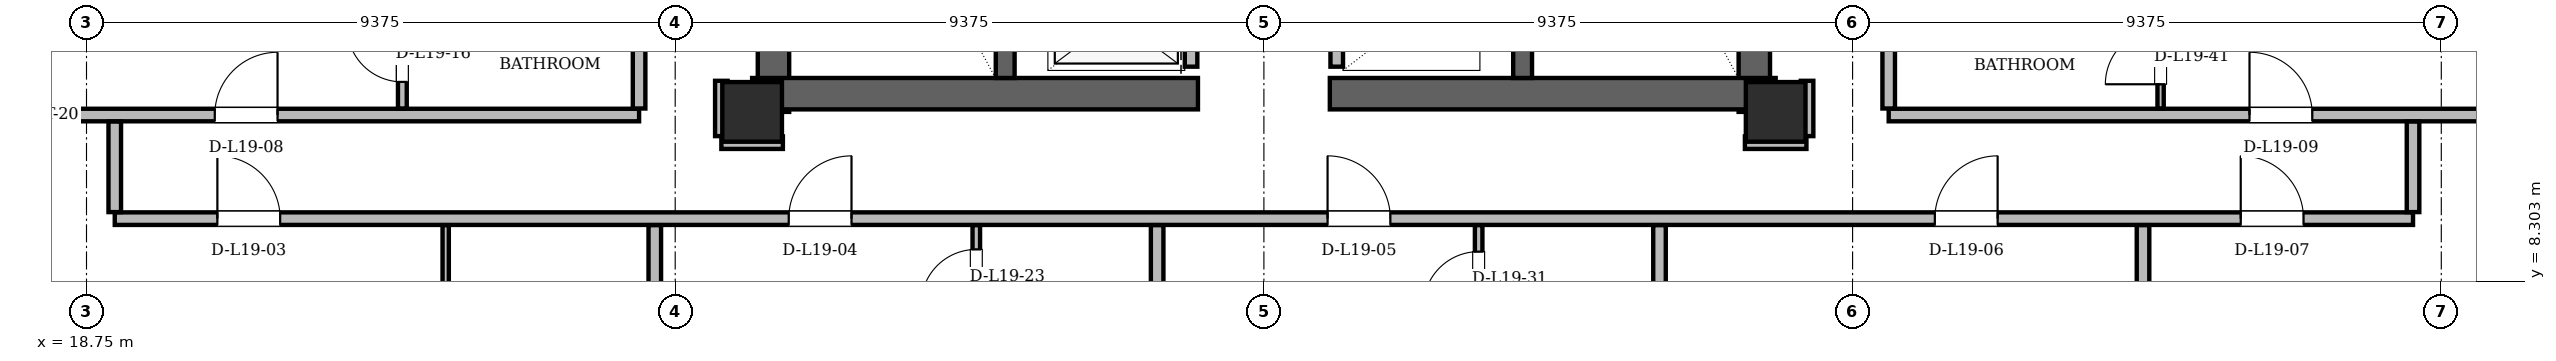
"""IFC4 building model, lengths in metres.
Left out: names, types, materials, properties, quantities, classifications, styles, units other than length and angle.
Written with IfcOpenShell. Run it as: python <this file> out.ifc"""

import sys

from ifc_helpers import new_model, si_unit, direction, frame, frame_2d, origin, origin_2d, place, context, subcontext, project, spatial, rectangle, hollow_rectangle, extrude, element, fill, save


model = new_model("IFC4")
c1 = context("Model", 3, precision=1e-05, world=origin(), true_north=direction((0.0, 1.0)))
c2 = subcontext(c1, "Body", "Model", "MODEL_VIEW")
j1 = project(units=[si_unit("LENGTHUNIT", "METRE"), si_unit("PLANEANGLEUNIT", "RADIAN")], contexts=[c1])
p1 = place(None, origin())
s1 = spatial("IfcSite", under=j1, at=p1, CompositionType="ELEMENT")
p2 = place(p1, origin())
s2 = spatial("IfcBuilding", under=s1, at=p2, CompositionType="ELEMENT")
p3 = place(p2, frame((0.0, 0.0, 74.1)))
s3 = spatial("IfcBuildingStorey", under=s2, at=p3, CompositionType="ELEMENT", Elevation=74.1)
for number, where, z_axis, x_axis in (
    (1, (29.35, 11.0, 0.0), (0.0, 0.0, 1.0), (1.0, 0.0, 0.0)),
    (2, (45.65, 11.0, 0.0), (0.0, 0.0, 1.0), (1.0, 0.0, 0.0)),
):
    element("IfcColumn", number, at=place(p3, frame(where, z_axis=z_axis, x_axis=x_axis)), inside=s3, PredefinedType="COLUMN", context=c2, shape_type="SweptSolid", body=[
        extrude(hollow_rectangle(XDim=0.95, YDim=0.95, WallThickness=0.08, at=origin_2d()), origin(), (0.0, 0.0, 1.0), 3.6),
    ])
for number, where, z_axis, x_axis in (
    (3, (29.69, 11.0, 0.0), (0.0, 0.0, 1.0), (0.0, 1.0, 0.0)),
    (4, (45.31, 11.0, 0.0), (0.0, 0.0, 1.0), (0.0, 1.0, 0.0)),
):
    element("IfcWall", number, at=place(p3, frame(where, z_axis=z_axis, x_axis=x_axis)), inside=s3, PredefinedType="SHEAR", context=c2, shape_type="SweptSolid", body=[
        extrude(rectangle(XDim=13.3, YDim=0.5, at=frame_2d((6.65, 0.0))), origin(), (0.0, 0.0, 1.0), 3.34),
    ])
for number, where, z_axis, x_axis in (
    (5, (29.35, 11.29, 0.0), (0.0, 0.0, 1.0), (1.0, 0.0, 0.0)),
    (6, (38.55, 11.29, 0.0), (0.0, 0.0, 1.0), (1.0, 0.0, 0.0)),
):
    element("IfcWall", number, at=place(p3, frame(where, z_axis=z_axis, x_axis=x_axis)), inside=s3, PredefinedType="SHEAR", context=c2, shape_type="SweptSolid", body=[
        extrude(rectangle(XDim=7.1, YDim=0.5, at=frame_2d((3.55, 0.0))), origin(), (0.0, 0.0, 1.0), 3.34),
    ])
for number, where, z_axis, x_axis in (
    (7, (33.38, 11.54, 0.0), (0.0, 0.0, 1.0), (0.0, 1.0, 0.0)),
    (8, (41.62, 11.54, 0.0), (0.0, 0.0, 1.0), (0.0, 1.0, 0.0)),
):
    element("IfcWall", number, at=place(p3, frame(where, z_axis=z_axis, x_axis=x_axis)), inside=s3, PredefinedType="SHEAR", context=c2, shape_type="SweptSolid", body=[
        extrude(rectangle(XDim=7.62, YDim=0.3, at=frame_2d((3.81, 0.0))), origin(), (0.0, 0.0, 1.0), 3.34),
    ])
for number, where, z_axis, x_axis in (
    (9, (13.907, 14.127, 0.0), (0.0, 0.0, 1.0), (0.5, -0.866, 0.0)),
    (10, (54.469, 2.654, 0.0), (0.0, 0.0, 1.0), (0.5, 0.866, 0.0)),
):
    element("IfcWall", number, at=place(p3, frame(where, z_axis=z_axis, x_axis=x_axis)), inside=s3, PredefinedType="SOLIDWALL", context=c2, shape_type="SweptSolid", body=[
        extrude(rectangle(XDim=13.248, YDim=0.34, at=frame_2d((6.624, 0.0))), origin(), (0.0, 0.0, 1.0), 2.474),
    ])
p4 = place(p3, frame((36.34, 11.72, 0.0), z_axis=(0.0, 0.0, 1.0), x_axis=(0.0, 1.0, 0.0)))
e11 = element("IfcWall", 11, at=p4, inside=s3, PredefinedType="PARTITIONING", context=c2, shape_type="SweptSolid", body=[
    extrude(rectangle(XDim=7.6, YDim=0.2, at=frame_2d((3.8, 0.0))), origin(), (0.0, 0.0, 1.0), 3.34),
])
p5 = place(p4, frame((0.255, 0.0, 0.0)))
e12 = element("IfcOpeningElement", 12, at=p5, cuts=e11, PredefinedType="OPENING", context=c2, shape_type="SweptSolid", body=[
    extrude(rectangle(XDim=1.05, YDim=2.15, at=frame_2d((0.525, 1.075))), frame((0.0, 0.1, 0.0), z_axis=(0.0, -1.0, 0.0), x_axis=(1.0, 0.0, 0.0)), (0.0, 0.0, 1.0), 0.2),
])
p6 = place(p4, frame((2.105, 0.0, 0.0)))
e13 = element("IfcOpeningElement", 13, at=p6, cuts=e11, PredefinedType="OPENING", context=c2, shape_type="SweptSolid", body=[
    extrude(rectangle(XDim=1.05, YDim=2.15, at=frame_2d((0.525, 1.075))), frame((0.0, 0.1, 0.0), z_axis=(0.0, -1.0, 0.0), x_axis=(1.0, 0.0, 0.0)), (0.0, 0.0, 1.0), 0.2),
])
p7 = place(p4, frame((3.955, 0.0, 0.0)))
e14 = element("IfcOpeningElement", 14, at=p7, cuts=e11, PredefinedType="OPENING", context=c2, shape_type="SweptSolid", body=[
    extrude(rectangle(XDim=1.05, YDim=2.15, at=frame_2d((0.525, 1.075))), frame((0.0, 0.1, 0.0), z_axis=(0.0, -1.0, 0.0), x_axis=(1.0, 0.0, 0.0)), (0.0, 0.0, 1.0), 0.2),
])
p8 = place(p3, frame((38.66, 11.72, 0.0), z_axis=(0.0, 0.0, 1.0), x_axis=(0.0, 1.0, 0.0)))
e15 = element("IfcWall", 15, at=p8, inside=s3, PredefinedType="PARTITIONING", context=c2, shape_type="SweptSolid", body=[
    extrude(rectangle(XDim=9.1, YDim=0.2, at=frame_2d((4.55, 0.0))), origin(), (0.0, 0.0, 1.0), 3.34),
])
p9 = place(p3, frame((19.2, 9.3, 0.0), z_axis=(0.0, 0.0, 1.0), x_axis=(1.0, 0.0, 0.0)))
e16 = element("IfcWall", 16, at=p9, inside=s3, PredefinedType="PARTITIONING", context=c2, shape_type="SweptSolid", body=[
    extrude(rectangle(XDim=36.6, YDim=0.2, at=frame_2d((18.3, 0.0))), origin(), (0.0, 0.0, 1.0), 2.718),
])
p10 = place(p9, frame((1.634, 0.0, 0.0)))
e17 = element("IfcOpeningElement", 17, at=p10, cuts=e16, PredefinedType="OPENING", context=c2, shape_type="SweptSolid", body=[
    extrude(rectangle(XDim=1.0, YDim=2.18, at=frame_2d((0.5, 1.09))), frame((0.0, 0.1, 0.0), z_axis=(0.0, -1.0, 0.0), x_axis=(1.0, 0.0, 0.0)), (0.0, 0.0, 1.0), 0.2),
])
p11 = place(p9, frame((10.733, 0.0, 0.0)))
e18 = element("IfcOpeningElement", 18, at=p11, cuts=e16, PredefinedType="OPENING", context=c2, shape_type="SweptSolid", body=[
    extrude(rectangle(XDim=1.0, YDim=2.18, at=frame_2d((0.5, 1.09))), frame((0.0, 0.1, 0.0), z_axis=(0.0, -1.0, 0.0), x_axis=(1.0, 0.0, 0.0)), (0.0, 0.0, 1.0), 0.2),
])
p12 = place(p9, frame((19.314, 0.0, 0.0)))
e19 = element("IfcOpeningElement", 19, at=p12, cuts=e16, PredefinedType="OPENING", context=c2, shape_type="SweptSolid", body=[
    extrude(rectangle(XDim=1.0, YDim=2.18, at=frame_2d((0.5, 1.09))), frame((0.0, 0.1, 0.0), z_axis=(0.0, -1.0, 0.0), x_axis=(1.0, 0.0, 0.0)), (0.0, 0.0, 1.0), 0.2),
])
p13 = place(p9, frame((28.985, 0.0, 0.0)))
e20 = element("IfcOpeningElement", 20, at=p13, cuts=e16, PredefinedType="OPENING", context=c2, shape_type="SweptSolid", body=[
    extrude(rectangle(XDim=1.0, YDim=2.18, at=frame_2d((0.5, 1.09))), frame((0.0, 0.1, 0.0), z_axis=(0.0, -1.0, 0.0), x_axis=(1.0, 0.0, 0.0)), (0.0, 0.0, 1.0), 0.2),
])
p14 = place(p9, frame((33.856, 0.0, 0.0)))
e21 = element("IfcOpeningElement", 21, at=p14, cuts=e16, PredefinedType="OPENING", context=c2, shape_type="SweptSolid", body=[
    extrude(rectangle(XDim=1.0, YDim=2.18, at=frame_2d((0.5, 1.09))), frame((0.0, 0.1, 0.0), z_axis=(0.0, -1.0, 0.0), x_axis=(1.0, 0.0, 0.0)), (0.0, 0.0, 1.0), 0.2),
])
for number, where, z_axis, x_axis in (
    (22, (28.86, 10.51, 0.0), (0.0, 0.0, 1.0), (1.0, 0.0, 0.0)),
    (23, (45.16, 10.51, 0.0), (0.0, 0.0, 1.0), (1.0, 0.0, 0.0)),
):
    element("IfcWall", number, at=place(p3, frame(where, z_axis=z_axis, x_axis=x_axis)), inside=s3, PredefinedType="PARTITIONING", context=c2, shape_type="SweptSolid", body=[
        extrude(rectangle(XDim=0.98, YDim=0.2, at=frame_2d((0.49, 0.0))), origin(), (0.0, 0.0, 1.0), 2.718),
    ])
p15 = place(p3, frame((15.942, 10.95, 0.0), z_axis=(0.0, 0.0, 1.0), x_axis=(1.0, 0.0, 0.0)))
e24 = element("IfcWall", 24, at=p15, inside=s3, PredefinedType="PARTITIONING", context=c2, shape_type="SweptSolid", body=[
    extrude(rectangle(XDim=11.608, YDim=0.2, at=frame_2d((5.804, 0.0))), origin(), (0.0, 0.0, 1.0), 3.34),
])
p16 = place(p15, frame((4.85, 0.0, 0.0)))
e25 = element("IfcOpeningElement", 25, at=p16, cuts=e24, PredefinedType="OPENING", context=c2, shape_type="SweptSolid", body=[
    extrude(rectangle(XDim=1.0, YDim=2.18, at=frame_2d((0.5, 1.09))), frame((0.0, 0.1, 0.0), z_axis=(0.0, -1.0, 0.0), x_axis=(1.0, 0.0, 0.0)), (0.0, 0.0, 1.0), 0.2),
])
p17 = place(p3, frame((47.45, 10.95, 0.0), z_axis=(0.0, 0.0, 1.0), x_axis=(1.0, 0.0, 0.0)))
e26 = element("IfcWall", 26, at=p17, inside=s3, PredefinedType="PARTITIONING", context=c2, shape_type="SweptSolid", body=[
    extrude(rectangle(XDim=11.608, YDim=0.2, at=frame_2d((5.804, 0.0))), origin(), (0.0, 0.0, 1.0), 3.34),
])
p18 = place(p17, frame((5.746, 0.0, 0.0)))
e27 = element("IfcOpeningElement", 27, at=p18, cuts=e26, PredefinedType="OPENING", context=c2, shape_type="SweptSolid", body=[
    extrude(rectangle(XDim=1.0, YDim=2.18, at=frame_2d((0.5, 1.09))), frame((0.0, 0.1, 0.0), z_axis=(0.0, -1.0, 0.0), x_axis=(1.0, 0.0, 0.0)), (0.0, 0.0, 1.0), 0.2),
])
p19 = place(p3, frame((19.2, 9.404, 0.0), z_axis=(0.0, 0.0, 1.0), x_axis=(0.0, 1.0, 0.0)))
e28 = element("IfcWall", 28, at=p19, inside=s3, PredefinedType="PARTITIONING", context=c2, shape_type="SweptSolid", body=[
    extrude(rectangle(XDim=1.442, YDim=0.2, at=frame_2d((0.721, 0.0))), origin(), (0.0, 0.0, 1.0), 3.34),
])
p20 = place(p3, frame((23.78, 11.054, 0.0), z_axis=(0.0, 0.0, 1.0), x_axis=(0.0, 1.0, 0.0)))
e29 = element("IfcWall", 29, at=p20, inside=s3, PredefinedType="PARTITIONING", context=c2, shape_type="SweptSolid", body=[
    extrude(rectangle(XDim=4.042, YDim=0.14, at=frame_2d((2.021, 0.0))), origin(), (0.0, 0.0, 1.0), 2.718),
])
p21 = place(p20, frame((0.424, 0.0, 0.0)))
e30 = element("IfcOpeningElement", 30, at=p21, cuts=e29, PredefinedType="OPENING", context=c2, shape_type="SweptSolid", body=[
    extrude(rectangle(XDim=0.88, YDim=2.08, at=frame_2d((0.44, 1.04))), frame((0.0, 0.07, 0.0), z_axis=(0.0, -1.0, 0.0), x_axis=(1.0, 0.0, 0.0)), (0.0, 0.0, 1.0), 0.14),
])
p22 = place(p20, frame((2.544, 0.0, 0.0)))
e31 = element("IfcOpeningElement", 31, at=p22, cuts=e29, PredefinedType="OPENING", context=c2, shape_type="SweptSolid", body=[
    extrude(rectangle(XDim=0.95, YDim=2.1, at=frame_2d((0.475, 1.05))), frame((0.0, 0.07, 0.0), z_axis=(0.0, -1.0, 0.0), x_axis=(1.0, 0.0, 0.0)), (0.0, 0.0, 1.0), 0.14),
])
p23 = place(p3, frame((24.47, 2.828, 0.0), z_axis=(0.0, 0.0, 1.0), x_axis=(0.0, 1.0, 0.0)))
e32 = element("IfcWall", 32, at=p23, inside=s3, PredefinedType="PARTITIONING", context=c2, shape_type="SweptSolid", body=[
    extrude(rectangle(XDim=6.368, YDim=0.1, at=frame_2d((3.184, 0.0))), origin(), (0.0, 0.0, 1.0), 2.718),
])
p24 = place(p23, frame((2.784, 0.0, 0.0)))
e33 = element("IfcOpeningElement", 33, at=p24, cuts=e32, PredefinedType="OPENING", context=c2, shape_type="SweptSolid", body=[
    extrude(rectangle(XDim=0.88, YDim=2.08, at=frame_2d((0.44, 1.04))), frame((0.0, 0.05, 0.0), z_axis=(0.0, -1.0, 0.0), x_axis=(1.0, 0.0, 0.0)), (0.0, 0.0, 1.0), 0.1),
])
p25 = place(p3, frame((27.55, 11.054, 0.0), z_axis=(0.0, 0.0, 1.0), x_axis=(0.0, 1.0, 0.0)))
e34 = element("IfcWall", 34, at=p25, inside=s3, PredefinedType="PARTITIONING", context=c2, shape_type="SweptSolid", body=[
    extrude(rectangle(XDim=14.812, YDim=0.2, at=frame_2d((7.406, 0.0))), origin(), (0.0, 0.0, 1.0), 2.718),
])
p26 = place(p25, frame((6.031, 0.0, 0.0)))
e35 = element("IfcOpeningElement", 35, at=p26, cuts=e34, PredefinedType="OPENING", context=c2, shape_type="SweptSolid", body=[
    extrude(rectangle(XDim=1.0, YDim=2.18, at=frame_2d((0.5, 1.09))), frame((0.0, 0.1, 0.0), z_axis=(0.0, -1.0, 0.0), x_axis=(1.0, 0.0, 0.0)), (0.0, 0.0, 1.0), 0.2),
])
p27 = place(p3, frame((27.8, 2.828, 0.0), z_axis=(0.0, 0.0, 1.0), x_axis=(0.0, 1.0, 0.0)))
e36 = element("IfcWall", 36, at=p27, inside=s3, PredefinedType="PARTITIONING", context=c2, shape_type="SweptSolid", body=[
    extrude(rectangle(XDim=6.368, YDim=0.2, at=frame_2d((3.184, 0.0))), origin(), (0.0, 0.0, 1.0), 2.926),
])
p28 = place(p3, frame((28.86, 10.614, 0.0), z_axis=(0.0, 0.0, 1.0), x_axis=(0.0, 1.0, 0.0)))
e37 = element("IfcWall", 37, at=p28, inside=s3, PredefinedType="PARTITIONING", context=c2, shape_type="SweptSolid", body=[
    extrude(rectangle(XDim=0.881, YDim=0.2, at=frame_2d((0.44, 0.0))), origin(), (0.0, 0.0, 1.0), 2.718),
])
p29 = place(p3, frame((32.92, 2.828, 0.0), z_axis=(0.0, 0.0, 1.0), x_axis=(0.0, 1.0, 0.0)))
e38 = element("IfcWall", 38, at=p29, inside=s3, PredefinedType="PARTITIONING", context=c2, shape_type="SweptSolid", body=[
    extrude(rectangle(XDim=6.368, YDim=0.12, at=frame_2d((3.184, 0.0))), origin(), (0.0, 0.0, 1.0), 2.926),
])
p30 = place(p29, frame((1.789, 0.0, 0.0)))
e39 = element("IfcOpeningElement", 39, at=p30, cuts=e38, PredefinedType="OPENING", context=c2, shape_type="SweptSolid", body=[
    extrude(rectangle(XDim=0.95, YDim=2.1, at=frame_2d((0.475, 1.05))), frame((0.0, 0.06, 0.0), z_axis=(0.0, -1.0, 0.0), x_axis=(1.0, 0.0, 0.0)), (0.0, 0.0, 1.0), 0.12),
])
p31 = place(p29, frame((5.102, 0.0, 0.0)))
e40 = element("IfcOpeningElement", 40, at=p31, cuts=e38, PredefinedType="OPENING", context=c2, shape_type="SweptSolid", body=[
    extrude(rectangle(XDim=0.88, YDim=2.08, at=frame_2d((0.44, 1.04))), frame((0.0, 0.06, 0.0), z_axis=(0.0, -1.0, 0.0), x_axis=(1.0, 0.0, 0.0)), (0.0, 0.0, 1.0), 0.12),
])
p32 = place(p3, frame((35.8, 2.828, 0.0), z_axis=(0.0, 0.0, 1.0), x_axis=(0.0, 1.0, 0.0)))
e41 = element("IfcWall", 41, at=p32, inside=s3, PredefinedType="PARTITIONING", context=c2, shape_type="SweptSolid", body=[
    extrude(rectangle(XDim=6.368, YDim=0.2, at=frame_2d((3.184, 0.0))), origin(), (0.0, 0.0, 1.0), 3.34),
])
p33 = place(p3, frame((40.92, 2.828, 0.0), z_axis=(0.0, 0.0, 1.0), x_axis=(0.0, 1.0, 0.0)))
e42 = element("IfcWall", 42, at=p33, inside=s3, PredefinedType="PARTITIONING", context=c2, shape_type="SweptSolid", body=[
    extrude(rectangle(XDim=6.368, YDim=0.12, at=frame_2d((3.184, 0.0))), origin(), (0.0, 0.0, 1.0), 3.34),
])
p34 = place(p33, frame((1.754, 0.0, 0.0)))
e43 = element("IfcOpeningElement", 43, at=p34, cuts=e42, PredefinedType="OPENING", context=c2, shape_type="SweptSolid", body=[
    extrude(rectangle(XDim=0.95, YDim=2.1, at=frame_2d((0.475, 1.05))), frame((0.0, 0.06, 0.0), z_axis=(0.0, -1.0, 0.0), x_axis=(1.0, 0.0, 0.0)), (0.0, 0.0, 1.0), 0.12),
])
p35 = place(p33, frame((5.066, 0.0, 0.0)))
e44 = element("IfcOpeningElement", 44, at=p35, cuts=e42, PredefinedType="OPENING", context=c2, shape_type="SweptSolid", body=[
    extrude(rectangle(XDim=0.88, YDim=2.08, at=frame_2d((0.44, 1.04))), frame((0.0, 0.06, 0.0), z_axis=(0.0, -1.0, 0.0), x_axis=(1.0, 0.0, 0.0)), (0.0, 0.0, 1.0), 0.12),
])
p36 = place(p3, frame((43.8, 2.828, 0.0), z_axis=(0.0, 0.0, 1.0), x_axis=(0.0, 1.0, 0.0)))
e45 = element("IfcWall", 45, at=p36, inside=s3, PredefinedType="PARTITIONING", context=c2, shape_type="SweptSolid", body=[
    extrude(rectangle(XDim=6.368, YDim=0.2, at=frame_2d((3.184, 0.0))), origin(), (0.0, 0.0, 1.0), 2.926),
])
p37 = place(p3, frame((46.15, 10.614, 0.0), z_axis=(0.0, 0.0, 1.0), x_axis=(0.0, 1.0, 0.0)))
e46 = element("IfcWall", 46, at=p37, inside=s3, PredefinedType="PARTITIONING", context=c2, shape_type="SweptSolid", body=[
    extrude(rectangle(XDim=0.881, YDim=0.2, at=frame_2d((0.44, 0.0))), origin(), (0.0, 0.0, 1.0), 2.718),
])
p38 = place(p3, frame((47.45, 11.054, 0.0), z_axis=(0.0, 0.0, 1.0), x_axis=(0.0, 1.0, 0.0)))
e47 = element("IfcWall", 47, at=p38, inside=s3, PredefinedType="PARTITIONING", context=c2, shape_type="SweptSolid", body=[
    extrude(rectangle(XDim=14.812, YDim=0.2, at=frame_2d((7.406, 0.0))), origin(), (0.0, 0.0, 1.0), 2.718),
])
p39 = place(p38, frame((13.529, 0.0, 0.0)))
e48 = element("IfcOpeningElement", 48, at=p39, cuts=e47, PredefinedType="OPENING", context=c2, shape_type="SweptSolid", body=[
    extrude(rectangle(XDim=1.0, YDim=2.18, at=frame_2d((0.5, 1.09))), frame((0.0, 0.1, 0.0), z_axis=(0.0, -1.0, 0.0), x_axis=(1.0, 0.0, 0.0)), (0.0, 0.0, 1.0), 0.2),
])
p40 = place(p3, frame((51.5, 2.828, 0.0), z_axis=(0.0, 0.0, 1.0), x_axis=(0.0, 1.0, 0.0)))
e49 = element("IfcWall", 49, at=p40, inside=s3, PredefinedType="PARTITIONING", context=c2, shape_type="SweptSolid", body=[
    extrude(rectangle(XDim=6.368, YDim=0.2, at=frame_2d((3.184, 0.0))), origin(), (0.0, 0.0, 1.0), 2.718),
])
p41 = place(p3, frame((51.78, 11.054, 0.0), z_axis=(0.0, 0.0, 1.0), x_axis=(0.0, 1.0, 0.0)))
e50 = element("IfcWall", 50, at=p41, inside=s3, PredefinedType="PARTITIONING", context=c2, shape_type="SweptSolid", body=[
    extrude(rectangle(XDim=13.162, YDim=0.1, at=frame_2d((6.581, 0.0))), origin(), (0.0, 0.0, 1.0), 2.718),
])
p42 = place(p41, frame((0.386, 0.0, 0.0)))
e51 = element("IfcOpeningElement", 51, at=p42, cuts=e50, PredefinedType="OPENING", context=c2, shape_type="SweptSolid", body=[
    extrude(rectangle(XDim=0.88, YDim=2.08, at=frame_2d((0.44, 1.04))), frame((0.0, 0.05, 0.0), z_axis=(0.0, -1.0, 0.0), x_axis=(1.0, 0.0, 0.0)), (0.0, 0.0, 1.0), 0.1),
])
p43 = place(p41, frame((2.368, 0.0, 0.0)))
e52 = element("IfcOpeningElement", 52, at=p43, cuts=e50, PredefinedType="OPENING", context=c2, shape_type="SweptSolid", body=[
    extrude(rectangle(XDim=0.95, YDim=2.1, at=frame_2d((0.475, 1.05))), frame((0.0, 0.05, 0.0), z_axis=(0.0, -1.0, 0.0), x_axis=(1.0, 0.0, 0.0)), (0.0, 0.0, 1.0), 0.1),
])
p44 = place(p41, frame((8.138, 0.0, 0.0)))
e53 = element("IfcOpeningElement", 53, at=p44, cuts=e50, PredefinedType="OPENING", context=c2, shape_type="SweptSolid", body=[
    extrude(rectangle(XDim=0.92, YDim=2.12, at=frame_2d((0.46, 1.06))), frame((0.0, 0.05, 0.0), z_axis=(0.0, -1.0, 0.0), x_axis=(1.0, 0.0, 0.0)), (0.0, 0.0, 1.0), 0.1),
])
p45 = place(p3, frame((55.8, 9.404, 0.0), z_axis=(0.0, 0.0, 1.0), x_axis=(0.0, 1.0, 0.0)))
e54 = element("IfcWall", 54, at=p45, inside=s3, PredefinedType="PARTITIONING", context=c2, shape_type="SweptSolid", body=[
    extrude(rectangle(XDim=1.442, YDim=0.2, at=frame_2d((0.721, 0.0))), origin(), (0.0, 0.0, 1.0), 3.34),
])
p46 = place(p10, origin())
e55 = element("IfcDoor", 55, at=p46, inside=s3, OperationType="SINGLE_SWING_LEFT", PredefinedType="DOOR", context=c2, shape_type="SweptSolid", body=[
    extrude(rectangle(XDim=1.0, YDim=2.18, at=frame_2d((0.5, 1.09))), frame((0.0, 0.025, 0.0), z_axis=(0.0, -1.0, 0.0), x_axis=(1.0, 0.0, 0.0)), (0.0, 0.0, 1.0), 0.05),
])
fill(e17, e55)
p47 = place(p11, origin())
e56 = element("IfcDoor", 56, at=p47, inside=s3, OperationType="SINGLE_SWING_RIGHT", PredefinedType="DOOR", context=c2, shape_type="SweptSolid", body=[
    extrude(rectangle(XDim=1.0, YDim=2.18, at=frame_2d((0.5, 1.09))), frame((0.0, 0.025, 0.0), z_axis=(0.0, -1.0, 0.0), x_axis=(1.0, 0.0, 0.0)), (0.0, 0.0, 1.0), 0.05),
])
fill(e18, e56)
p48 = place(p12, origin())
e57 = element("IfcDoor", 57, at=p48, inside=s3, OperationType="SINGLE_SWING_LEFT", PredefinedType="DOOR", context=c2, shape_type="SweptSolid", body=[
    extrude(rectangle(XDim=1.0, YDim=2.18, at=frame_2d((0.5, 1.09))), frame((0.0, 0.025, 0.0), z_axis=(0.0, -1.0, 0.0), x_axis=(1.0, 0.0, 0.0)), (0.0, 0.0, 1.0), 0.05),
])
fill(e19, e57)
p49 = place(p13, origin())
e58 = element("IfcDoor", 58, at=p49, inside=s3, OperationType="SINGLE_SWING_RIGHT", PredefinedType="DOOR", context=c2, shape_type="SweptSolid", body=[
    extrude(rectangle(XDim=1.0, YDim=2.18, at=frame_2d((0.5, 1.09))), frame((0.0, 0.025, 0.0), z_axis=(0.0, -1.0, 0.0), x_axis=(1.0, 0.0, 0.0)), (0.0, 0.0, 1.0), 0.05),
])
fill(e20, e58)
p50 = place(p14, origin())
e59 = element("IfcDoor", 59, at=p50, inside=s3, OperationType="SINGLE_SWING_LEFT", PredefinedType="DOOR", context=c2, shape_type="SweptSolid", body=[
    extrude(rectangle(XDim=1.0, YDim=2.18, at=frame_2d((0.5, 1.09))), frame((0.0, 0.025, 0.0), z_axis=(0.0, -1.0, 0.0), x_axis=(1.0, 0.0, 0.0)), (0.0, 0.0, 1.0), 0.05),
])
fill(e21, e59)
p51 = place(p16, origin())
e60 = element("IfcDoor", 60, at=p51, inside=s3, OperationType="SINGLE_SWING_RIGHT", PredefinedType="DOOR", context=c2, shape_type="SweptSolid", body=[
    extrude(rectangle(XDim=1.0, YDim=2.18, at=frame_2d((0.5, 1.09))), frame((0.0, 0.025, 0.0), z_axis=(0.0, -1.0, 0.0), x_axis=(1.0, 0.0, 0.0)), (0.0, 0.0, 1.0), 0.05),
])
fill(e25, e60)
p52 = place(p18, origin())
e61 = element("IfcDoor", 61, at=p52, inside=s3, OperationType="SINGLE_SWING_LEFT", PredefinedType="DOOR", context=c2, shape_type="SweptSolid", body=[
    extrude(rectangle(XDim=1.0, YDim=2.18, at=frame_2d((0.5, 1.09))), frame((0.0, 0.025, 0.0), z_axis=(0.0, -1.0, 0.0), x_axis=(1.0, 0.0, 0.0)), (0.0, 0.0, 1.0), 0.05),
])
fill(e27, e61)
p53 = place(p21, origin())
e62 = element("IfcDoor", 62, at=p53, inside=s3, OperationType="SINGLE_SWING_RIGHT", PredefinedType="DOOR", context=c2, shape_type="SweptSolid", body=[
    extrude(rectangle(XDim=0.88, YDim=2.08, at=frame_2d((0.44, 1.04))), frame((0.0, 0.025, 0.0), z_axis=(0.0, -1.0, 0.0), x_axis=(1.0, 0.0, 0.0)), (0.0, 0.0, 1.0), 0.05),
])
fill(e30, e62)
p54 = place(p31, origin())
e63 = element("IfcDoor", 63, at=p54, inside=s3, OperationType="SINGLE_SWING_LEFT", PredefinedType="DOOR", context=c2, shape_type="SweptSolid", body=[
    extrude(rectangle(XDim=0.88, YDim=2.08, at=frame_2d((0.44, 1.04))), frame((0.0, 0.025, 0.0), z_axis=(0.0, -1.0, 0.0), x_axis=(1.0, 0.0, 0.0)), (0.0, 0.0, 1.0), 0.05),
])
fill(e40, e63)
p55 = place(p35, origin())
e64 = element("IfcDoor", 64, at=p55, inside=s3, OperationType="SINGLE_SWING_LEFT", PredefinedType="DOOR", context=c2, shape_type="SweptSolid", body=[
    extrude(rectangle(XDim=0.88, YDim=2.08, at=frame_2d((0.44, 1.04))), frame((0.0, 0.025, 0.0), z_axis=(0.0, -1.0, 0.0), x_axis=(1.0, 0.0, 0.0)), (0.0, 0.0, 1.0), 0.05),
])
fill(e44, e64)
p56 = place(p42, origin())
e65 = element("IfcDoor", 65, at=p56, inside=s3, OperationType="SINGLE_SWING_LEFT", PredefinedType="DOOR", context=c2, shape_type="SweptSolid", body=[
    extrude(rectangle(XDim=0.88, YDim=2.08, at=frame_2d((0.44, 1.04))), frame((0.0, 0.025, 0.0), z_axis=(0.0, -1.0, 0.0), x_axis=(1.0, 0.0, 0.0)), (0.0, 0.0, 1.0), 0.05),
])
fill(e51, e65)
save(model, sys.argv[1])
